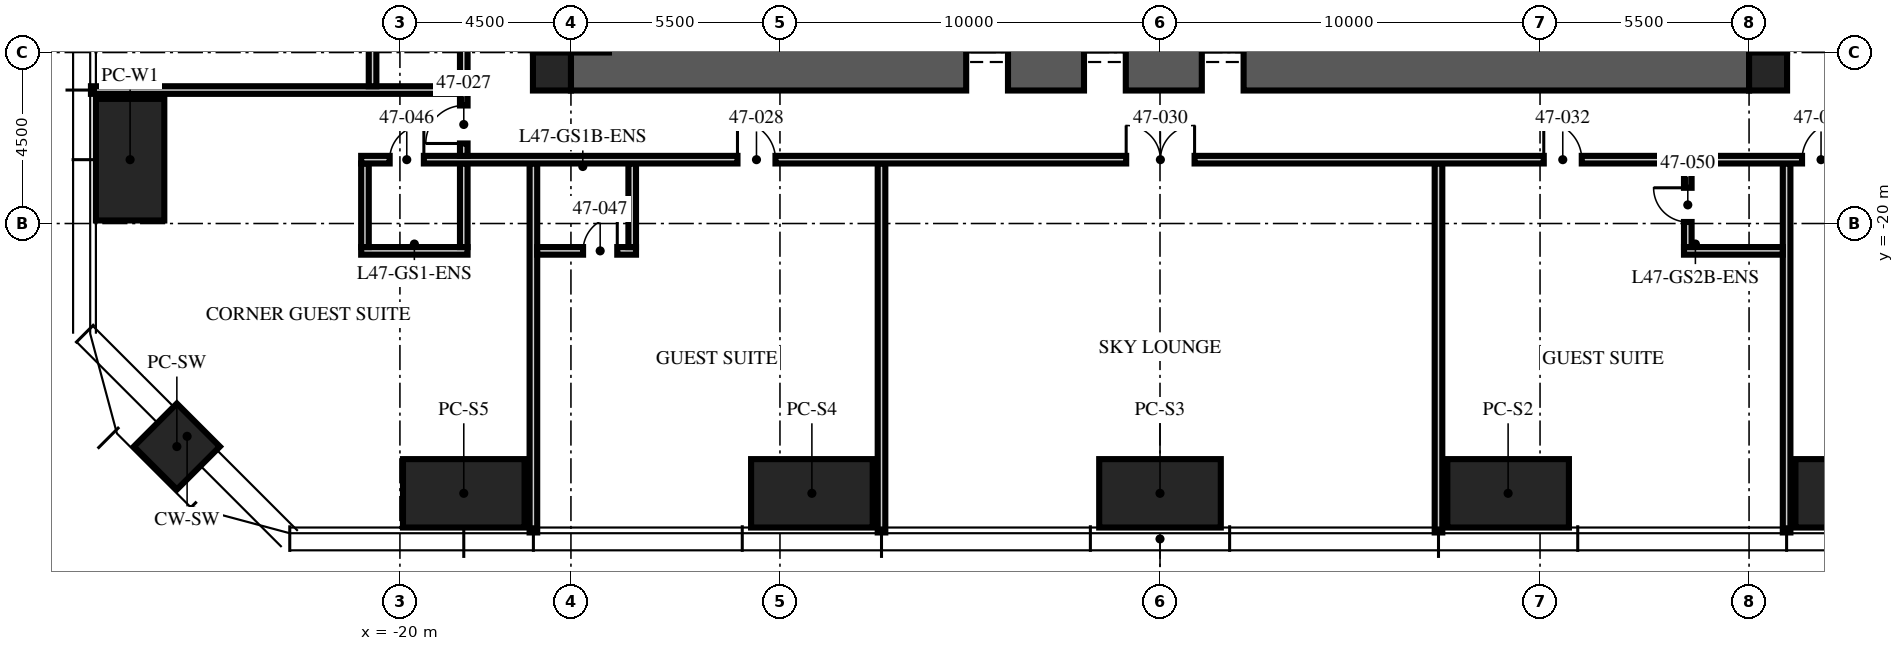
"""IFC4 building model, lengths in metres.
Left out: names, types, materials, properties, quantities, classifications, styles, units other than length and angle.
Written with IfcOpenShell. Run it as: python <this file> out.ifc"""

import sys

from ifc_helpers import new_model, si_unit, direction, frame, frame_2d, origin, origin_2d, place, context, subcontext, project, spatial, rectangle, hollow_rectangle, extrude, element, fill, save


model = new_model("IFC4")
c1 = context("Model", 3, precision=1e-05, world=origin(), true_north=direction((0.0, 1.0)))
c2 = subcontext(c1, "Body", "Model", "MODEL_VIEW")
j1 = project(units=[si_unit("LENGTHUNIT", "METRE"), si_unit("PLANEANGLEUNIT", "RADIAN")], contexts=[c1])
p1 = place(None, origin())
s1 = spatial("IfcSite", under=j1, at=p1, CompositionType="ELEMENT")
p2 = place(p1, origin())
s2 = spatial("IfcBuilding", under=s1, at=p2, CompositionType="ELEMENT")
p3 = place(p2, frame((0.0, 0.0, 186.0)))
s3 = spatial("IfcBuildingStorey", under=s2, at=p3, CompositionType="ELEMENT", Elevation=186.0)
p4 = place(p3, frame((15.5, -15.5, -0.3), z_axis=(0.0, 0.0, 1.0), x_axis=(0.0, 1.0, 0.0)))
e1 = element("IfcWall", 1, at=p4, inside=s3, PredefinedType="SHEAR", context=c2, shape_type="SweptSolid", body=[
    extrude(rectangle(XDim=31.0, YDim=2.0, at=frame_2d((15.5, 0.0))), origin(), (0.0, 0.0, 1.0), 5.95),
])
p5 = place(p4, frame((6.5, 0.0, 0.3)))
e2 = element("IfcOpeningElement", 2, at=p5, cuts=e1, PredefinedType="OPENING", context=c2, shape_type="SweptSolid", body=[
    extrude(rectangle(XDim=1.2, YDim=2.1, at=frame_2d((0.6, 1.05))), frame((0.0, 1.01, 0.0), z_axis=(0.0, -1.0, 0.0), x_axis=(1.0, 0.0, 0.0)), (0.0, 0.0, 1.0), 2.02),
])
p6 = place(p4, frame((23.0, 0.0, 0.3)))
e3 = element("IfcOpeningElement", 3, at=p6, cuts=e1, PredefinedType="OPENING", context=c2, shape_type="SweptSolid", body=[
    extrude(rectangle(XDim=1.8, YDim=2.1, at=frame_2d((0.9, 1.05))), frame((0.0, 1.01, 0.0), z_axis=(0.0, -1.0, 0.0), x_axis=(1.0, 0.0, 0.0)), (0.0, 0.0, 1.0), 2.02),
])
p7 = place(p3, frame((-15.5, -15.5, -0.3), z_axis=(0.0, 0.0, 1.0), x_axis=(1.0, 0.0, 0.0)))
e4 = element("IfcWall", 4, at=p7, inside=s3, PredefinedType="SHEAR", context=c2, shape_type="SweptSolid", body=[
    extrude(rectangle(XDim=31.0, YDim=2.0, at=frame_2d((15.5, 0.0))), origin(), (0.0, 0.0, 1.0), 5.95),
])
p8 = place(p7, frame((10.4, 0.0, 0.3)))
e5 = element("IfcOpeningElement", 5, at=p8, cuts=e4, PredefinedType="OPENING", context=c2, shape_type="SweptSolid", body=[
    extrude(rectangle(XDim=1.1, YDim=2.1, at=frame_2d((0.55, 1.05))), frame((0.0, 1.01, 0.0), z_axis=(0.0, -1.0, 0.0), x_axis=(1.0, 0.0, 0.0)), (0.0, 0.0, 1.0), 2.02),
])
p9 = place(p7, frame((13.5, 0.0, 0.3)))
e6 = element("IfcOpeningElement", 6, at=p9, cuts=e4, PredefinedType="OPENING", context=c2, shape_type="SweptSolid", body=[
    extrude(rectangle(XDim=1.1, YDim=2.1, at=frame_2d((0.55, 1.05))), frame((0.0, 1.01, 0.0), z_axis=(0.0, -1.0, 0.0), x_axis=(1.0, 0.0, 0.0)), (0.0, 0.0, 1.0), 2.02),
])
p10 = place(p7, frame((16.6, 0.0, 0.3)))
e7 = element("IfcOpeningElement", 7, at=p10, cuts=e4, PredefinedType="OPENING", context=c2, shape_type="SweptSolid", body=[
    extrude(rectangle(XDim=1.1, YDim=2.1, at=frame_2d((0.55, 1.05))), frame((0.0, 1.01, 0.0), z_axis=(0.0, -1.0, 0.0), x_axis=(1.0, 0.0, 0.0)), (0.0, 0.0, 1.0), 2.02),
])
p11 = place(p3, frame((-15.5, -15.5, -0.3), z_axis=(0.0, 0.0, 1.0), x_axis=(0.0, 1.0, 0.0)))
e8 = element("IfcWall", 8, at=p11, inside=s3, PredefinedType="SHEAR", context=c2, shape_type="SweptSolid", body=[
    extrude(rectangle(XDim=31.0, YDim=2.0, at=frame_2d((15.5, 0.0))), origin(), (0.0, 0.0, 1.0), 5.95),
])
p12 = place(p11, frame((6.5, 0.0, 0.3)))
e9 = element("IfcOpeningElement", 9, at=p12, cuts=e8, PredefinedType="OPENING", context=c2, shape_type="SweptSolid", body=[
    extrude(rectangle(XDim=1.2, YDim=2.1, at=frame_2d((0.6, 1.05))), frame((0.0, 1.01, 0.0), z_axis=(0.0, -1.0, 0.0), x_axis=(1.0, 0.0, 0.0)), (0.0, 0.0, 1.0), 2.02),
])
p13 = place(p11, frame((23.0, 0.0, 0.3)))
e10 = element("IfcOpeningElement", 10, at=p13, cuts=e8, PredefinedType="OPENING", context=c2, shape_type="SweptSolid", body=[
    extrude(rectangle(XDim=1.8, YDim=2.1, at=frame_2d((0.9, 1.05))), frame((0.0, 1.01, 0.0), z_axis=(0.0, -1.0, 0.0), x_axis=(1.0, 0.0, 0.0)), (0.0, 0.0, 1.0), 2.02),
])
for number, where, z_axis, x_axis in (
    (11, (-16.0, -16.0, -0.3), (0.0, 0.0, 1.0), (1.0, 0.0, 0.0)),
    (12, (16.0, -16.0, -0.3), (0.0, 0.0, 1.0), (1.0, 0.0, 0.0)),
):
    element("IfcColumn", number, at=place(p3, frame(where, z_axis=z_axis, x_axis=x_axis)), inside=s3, PredefinedType="COLUMN", context=c2, shape_type="SweptSolid", body=[
        extrude(rectangle(XDim=1.0, YDim=1.0, at=origin_2d()), origin(), (0.0, 0.0, 1.0), 5.95),
    ])
p14 = place(p3, frame((18.32, -27.1, 0.0), z_axis=(0.0, 0.0, 1.0), x_axis=(1.0, 0.0, 0.0)))
e13 = element("IfcColumn", 13, at=p14, inside=s3, PredefinedType="COLUMN", context=c2, shape_type="SweptSolid", body=[
    extrude(hollow_rectangle(XDim=3.2, YDim=1.8, WallThickness=0.2, at=origin_2d()), origin(), (0.0, 0.0, 1.0), 4.72),
])
p15 = place(p3, frame((9.16, -27.1, 0.0), z_axis=(0.0, 0.0, 1.0), x_axis=(1.0, 0.0, 0.0)))
e14 = element("IfcColumn", 14, at=p15, inside=s3, PredefinedType="COLUMN", context=c2, shape_type="SweptSolid", body=[
    extrude(hollow_rectangle(XDim=3.2, YDim=1.8, WallThickness=0.2, at=origin_2d()), origin(), (0.0, 0.0, 1.0), 4.87),
])
p16 = place(p3, frame((0.0, -27.1, 0.0), z_axis=(0.0, 0.0, 1.0), x_axis=(1.0, 0.0, 0.0)))
e15 = element("IfcColumn", 15, at=p16, inside=s3, PredefinedType="COLUMN", context=c2, shape_type="SweptSolid", body=[
    extrude(hollow_rectangle(XDim=3.2, YDim=1.8, WallThickness=0.2, at=origin_2d()), origin(), (0.0, 0.0, 1.0), 5.03),
])
p17 = place(p3, frame((-9.16, -27.1, 0.0), z_axis=(0.0, 0.0, 1.0), x_axis=(1.0, 0.0, 0.0)))
e16 = element("IfcColumn", 16, at=p17, inside=s3, PredefinedType="COLUMN", context=c2, shape_type="SweptSolid", body=[
    extrude(hollow_rectangle(XDim=3.2, YDim=1.8, WallThickness=0.2, at=origin_2d()), origin(), (0.0, 0.0, 1.0), 4.87),
])
for number, where, z_axis, x_axis in (
    (17, (-18.32, -27.1, 0.0), (0.0, 0.0, 1.0), (1.0, 0.0, 0.0)),
    (18, (-27.1, -18.32, 0.0), (0.0, 0.0, 1.0), (0.0, 1.0, 0.0)),
):
    element("IfcColumn", number, at=place(p3, frame(where, z_axis=z_axis, x_axis=x_axis)), inside=s3, PredefinedType="COLUMN", context=c2, shape_type="SweptSolid", body=[
        extrude(hollow_rectangle(XDim=3.2, YDim=1.8, WallThickness=0.2, at=origin_2d()), origin(), (0.0, 0.0, 1.0), 4.72),
    ])
p18 = place(p3, frame((-25.87, -25.87, 0.0), z_axis=(0.0, 0.0, 1.0), x_axis=(0.707106781187, -0.707106781187, 0.0)))
e19 = element("IfcColumn", 19, at=p18, inside=s3, PredefinedType="COLUMN", context=c2, shape_type="SweptSolid", body=[
    extrude(hollow_rectangle(XDim=1.6, YDim=1.6, WallThickness=0.1, at=origin_2d()), origin(), (0.0, 0.0, 1.0), 4.99),
])
for number, where, z_axis, x_axis in (
    (20, (-16.488, -28.13, 0.0), (0.0, 0.0, 1.0), (0.0, 1.0, 0.0)),
    (21, (-7.328, -28.13, 0.0), (0.0, 0.0, 1.0), (0.0, 1.0, 0.0)),
    (22, (7.328, -28.13, 0.0), (0.0, 0.0, 1.0), (0.0, 1.0, 0.0)),
    (23, (16.488, -28.13, 0.0), (0.0, 0.0, 1.0), (0.0, 1.0, 0.0)),
):
    element("IfcWall", number, at=place(p3, frame(where, z_axis=z_axis, x_axis=x_axis)), inside=s3, PredefinedType="SOLIDWALL", context=c2, shape_type="SweptSolid", body=[
        extrude(rectangle(XDim=9.71, YDim=0.2, at=frame_2d((4.855, 0.0))), origin(), (0.0, 0.0, 1.0), 4.95),
    ])
p19 = place(p3, frame((-21.02, -20.72, 0.0), z_axis=(0.0, 0.0, 1.0), x_axis=(1.0, 0.0, 0.0)))
e24 = element("IfcWall", 24, at=p19, inside=s3, PredefinedType="SOLIDWALL", context=c2, shape_type="SweptSolid", body=[
    extrude(rectangle(XDim=2.8, YDim=0.2, at=frame_2d((1.4, 0.0))), origin(), (0.0, 0.0, 1.0), 4.45),
])
p20 = place(p3, frame((-16.388, -20.72, 0.0), z_axis=(0.0, 0.0, 1.0), x_axis=(1.0, 0.0, 0.0)))
e25 = element("IfcWall", 25, at=p20, inside=s3, PredefinedType="SOLIDWALL", context=c2, shape_type="SweptSolid", body=[
    extrude(rectangle(XDim=2.6, YDim=0.2, at=frame_2d((1.3, 0.0))), origin(), (0.0, 0.0, 1.0), 4.45),
])
p21 = place(p20, frame((1.207, 0.0, 0.0)))
e26 = element("IfcOpeningElement", 26, at=p21, cuts=e25, PredefinedType="OPENING", context=c2, shape_type="SweptSolid", body=[
    extrude(rectangle(XDim=0.9, YDim=2.1, at=frame_2d((0.45, 1.05))), frame((0.0, 0.11, 0.0), z_axis=(0.0, -1.0, 0.0), x_axis=(1.0, 0.0, 0.0)), (0.0, 0.0, 1.0), 0.22),
])
p22 = place(p3, frame((13.788, -20.72, 0.0), z_axis=(0.0, 0.0, 1.0), x_axis=(1.0, 0.0, 0.0)))
e27 = element("IfcWall", 27, at=p22, inside=s3, PredefinedType="SOLIDWALL", context=c2, shape_type="SweptSolid", body=[
    extrude(rectangle(XDim=2.6, YDim=0.2, at=frame_2d((1.3, 0.0))), origin(), (0.0, 0.0, 1.0), 4.45),
])
for number, where, z_axis, x_axis in (
    (28, (-20.92, -20.62, 0.0), (0.0, 0.0, 1.0), (0.0, 1.0, 0.0)),
    (29, (-18.32, -20.62, 0.0), (0.0, 0.0, 1.0), (0.0, 1.0, 0.0)),
    (30, (-13.888, -20.62, 0.0), (0.0, 0.0, 1.0), (0.0, 1.0, 0.0)),
):
    element("IfcWall", number, at=place(p3, frame(where, z_axis=z_axis, x_axis=x_axis)), inside=s3, PredefinedType="SOLIDWALL", context=c2, shape_type="SweptSolid", body=[
        extrude(rectangle(XDim=2.2, YDim=0.2, at=frame_2d((1.1, 0.0))), origin(), (0.0, 0.0, 1.0), 4.45),
    ])
p23 = place(p3, frame((13.888, -20.62, 0.0), z_axis=(0.0, 0.0, 1.0), x_axis=(0.0, 1.0, 0.0)))
e31 = element("IfcWall", 31, at=p23, inside=s3, PredefinedType="SOLIDWALL", context=c2, shape_type="SweptSolid", body=[
    extrude(rectangle(XDim=2.2, YDim=0.2, at=frame_2d((1.1, 0.0))), origin(), (0.0, 0.0, 1.0), 4.45),
])
p24 = place(p23, frame((0.66, 0.0, 0.0)))
e32 = element("IfcOpeningElement", 32, at=p24, cuts=e31, PredefinedType="OPENING", context=c2, shape_type="SweptSolid", body=[
    extrude(rectangle(XDim=0.9, YDim=2.1, at=frame_2d((0.45, 1.05))), frame((0.0, 0.11, 0.0), z_axis=(0.0, -1.0, 0.0), x_axis=(1.0, 0.0, 0.0)), (0.0, 0.0, 1.0), 0.22),
])
p25 = place(p3, frame((-21.02, -18.32, 0.0), z_axis=(0.0, 0.0, 1.0), x_axis=(1.0, 0.0, 0.0)))
e33 = element("IfcWall", 33, at=p25, inside=s3, PredefinedType="SOLIDWALL", context=c2, shape_type="SweptSolid", body=[
    extrude(rectangle(XDim=42.04, YDim=0.2, at=frame_2d((21.02, 0.0))), origin(), (0.0, 0.0, 1.0), 4.45),
])
p26 = place(p25, frame((9.902, 0.0, 0.0)))
e34 = element("IfcOpeningElement", 34, at=p26, cuts=e33, PredefinedType="OPENING", context=c2, shape_type="SweptSolid", body=[
    extrude(rectangle(XDim=1.0, YDim=2.1, at=frame_2d((0.5, 1.05))), frame((0.0, 0.11, 0.0), z_axis=(0.0, -1.0, 0.0), x_axis=(1.0, 0.0, 0.0)), (0.0, 0.0, 1.0), 0.22),
])
p27 = place(p25, frame((20.13, 0.0, 0.0)))
e35 = element("IfcOpeningElement", 35, at=p27, cuts=e33, PredefinedType="OPENING", context=c2, shape_type="SweptSolid", body=[
    extrude(rectangle(XDim=1.8, YDim=2.4, at=frame_2d((0.9, 1.2))), frame((0.0, 0.11, 0.0), z_axis=(0.0, -1.0, 0.0), x_axis=(1.0, 0.0, 0.0)), (0.0, 0.0, 1.0), 0.22),
])
p28 = place(p25, frame((37.914, 0.0, 0.0)))
e36 = element("IfcOpeningElement", 36, at=p28, cuts=e33, PredefinedType="OPENING", context=c2, shape_type="SweptSolid", body=[
    extrude(rectangle(XDim=1.0, YDim=2.1, at=frame_2d((0.5, 1.05))), frame((0.0, 0.11, 0.0), z_axis=(0.0, -1.0, 0.0), x_axis=(1.0, 0.0, 0.0)), (0.0, 0.0, 1.0), 0.22),
])
p29 = place(p25, frame((31.118, 0.0, 0.0)))
e37 = element("IfcOpeningElement", 37, at=p29, cuts=e33, PredefinedType="OPENING", context=c2, shape_type="SweptSolid", body=[
    extrude(rectangle(XDim=1.0, YDim=2.1, at=frame_2d((0.5, 1.05))), frame((0.0, 0.11, 0.0), z_axis=(0.0, -1.0, 0.0), x_axis=(1.0, 0.0, 0.0)), (0.0, 0.0, 1.0), 0.22),
])
p30 = place(p25, frame((0.75, 0.0, 0.0)))
e38 = element("IfcOpeningElement", 38, at=p30, cuts=e33, PredefinedType="OPENING", context=c2, shape_type="SweptSolid", body=[
    extrude(rectangle(XDim=0.9, YDim=2.1, at=frame_2d((0.45, 1.05))), frame((0.0, 0.11, 0.0), z_axis=(0.0, -1.0, 0.0), x_axis=(1.0, 0.0, 0.0)), (0.0, 0.0, 1.0), 0.22),
])
p31 = place(p25, frame((39.99, 0.0, 0.0)))
e39 = element("IfcOpeningElement", 39, at=p31, cuts=e33, PredefinedType="OPENING", context=c2, shape_type="SweptSolid", body=[
    extrude(rectangle(XDim=0.9, YDim=2.1, at=frame_2d((0.45, 1.05))), frame((0.0, 0.11, 0.0), z_axis=(0.0, -1.0, 0.0), x_axis=(1.0, 0.0, 0.0)), (0.0, 0.0, 1.0), 0.22),
])
p32 = place(p3, frame((-18.32, -18.22, 0.0), z_axis=(0.0, 0.0, 1.0), x_axis=(0.0, 1.0, 0.0)))
e40 = element("IfcWall", 40, at=p32, inside=s3, PredefinedType="SOLIDWALL", context=c2, shape_type="SweptSolid", body=[
    extrude(rectangle(XDim=36.44, YDim=0.2, at=frame_2d((18.22, 0.0))), origin(), (0.0, 0.0, 1.0), 4.45),
])
p33 = place(p32, frame((0.326, 0.0, 0.0)))
e41 = element("IfcOpeningElement", 41, at=p33, cuts=e40, PredefinedType="OPENING", context=c2, shape_type="SweptSolid", body=[
    extrude(rectangle(XDim=1.0, YDim=2.1, at=frame_2d((0.5, 1.05))), frame((0.0, 0.11, 0.0), z_axis=(0.0, -1.0, 0.0), x_axis=(1.0, 0.0, 0.0)), (0.0, 0.0, 1.0), 0.22),
])
p34 = place(p32, frame((7.122, 0.0, 0.0)))
e42 = element("IfcOpeningElement", 42, at=p34, cuts=e40, PredefinedType="OPENING", context=c2, shape_type="SweptSolid", body=[
    extrude(rectangle(XDim=1.0, YDim=2.1, at=frame_2d((0.5, 1.05))), frame((0.0, 0.11, 0.0), z_axis=(0.0, -1.0, 0.0), x_axis=(1.0, 0.0, 0.0)), (0.0, 0.0, 1.0), 0.22),
])
p35 = place(p32, frame((28.338, 0.0, 0.0)))
e43 = element("IfcOpeningElement", 43, at=p35, cuts=e40, PredefinedType="OPENING", context=c2, shape_type="SweptSolid", body=[
    extrude(rectangle(XDim=1.0, YDim=2.1, at=frame_2d((0.5, 1.05))), frame((0.0, 0.11, 0.0), z_axis=(0.0, -1.0, 0.0), x_axis=(1.0, 0.0, 0.0)), (0.0, 0.0, 1.0), 0.22),
])
p36 = place(p32, frame((22.34, 0.0, 0.0)))
e44 = element("IfcOpeningElement", 44, at=p36, cuts=e40, PredefinedType="OPENING", context=c2, shape_type="SweptSolid", body=[
    extrude(rectangle(XDim=0.9, YDim=2.1, at=frame_2d((0.45, 1.05))), frame((0.0, 0.11, 0.0), z_axis=(0.0, -1.0, 0.0), x_axis=(1.0, 0.0, 0.0)), (0.0, 0.0, 1.0), 0.22),
])
p37 = place(p32, frame((13.2, 0.0, 0.0)))
e45 = element("IfcOpeningElement", 45, at=p37, cuts=e40, PredefinedType="OPENING", context=c2, shape_type="SweptSolid", body=[
    extrude(rectangle(XDim=0.9, YDim=2.1, at=frame_2d((0.45, 1.05))), frame((0.0, 0.11, 0.0), z_axis=(0.0, -1.0, 0.0), x_axis=(1.0, 0.0, 0.0)), (0.0, 0.0, 1.0), 0.22),
])
p38 = place(p32, frame((17.72, 0.0, 0.0)))
e46 = element("IfcOpeningElement", 46, at=p38, cuts=e40, PredefinedType="OPENING", context=c2, shape_type="SweptSolid", body=[
    extrude(rectangle(XDim=1.0, YDim=2.1, at=frame_2d((0.5, 1.05))), frame((0.0, 0.11, 0.0), z_axis=(0.0, -1.0, 0.0), x_axis=(1.0, 0.0, 0.0)), (0.0, 0.0, 1.0), 0.22),
])
p39 = place(p3, frame((-28.13, -16.488, 0.0), z_axis=(0.0, 0.0, 1.0), x_axis=(1.0, 0.0, 0.0)))
e47 = element("IfcWall", 47, at=p39, inside=s3, PredefinedType="SOLIDWALL", context=c2, shape_type="SweptSolid", body=[
    extrude(rectangle(XDim=9.71, YDim=0.2, at=frame_2d((4.855, 0.0))), origin(), (0.0, 0.0, 1.0), 4.95),
])
p40 = place(p3, frame((-20.72, -16.388, 0.0), z_axis=(0.0, 0.0, 1.0), x_axis=(0.0, 1.0, 0.0)))
e48 = element("IfcWall", 48, at=p40, inside=s3, PredefinedType="SOLIDWALL", context=c2, shape_type="SweptSolid", body=[
    extrude(rectangle(XDim=2.4, YDim=0.2, at=frame_2d((1.2, 0.0))), origin(), (0.0, 0.0, 1.0), 5.65),
])
p41 = place(p40, frame((1.207, 0.0, 0.0)))
e49 = element("IfcOpeningElement", 49, at=p41, cuts=e48, PredefinedType="OPENING", context=c2, shape_type="SweptSolid", body=[
    extrude(rectangle(XDim=0.9, YDim=2.1, at=frame_2d((0.45, 1.05))), frame((0.0, 0.11, 0.0), z_axis=(0.0, -1.0, 0.0), x_axis=(1.0, 0.0, 0.0)), (0.0, 0.0, 1.0), 0.22),
])
p42 = place(p8, origin())
e50 = element("IfcDoor", 50, at=p42, inside=s3, OperationType="DOUBLE_DOOR_SLIDING", PredefinedType="DOOR", context=c2, shape_type="SweptSolid", body=[
    extrude(rectangle(XDim=1.1, YDim=2.1, at=frame_2d((0.55, 1.05))), frame((0.0, 0.025, 0.0), z_axis=(0.0, -1.0, 0.0), x_axis=(1.0, 0.0, 0.0)), (0.0, 0.0, 1.0), 0.05),
])
fill(e5, e50)
p43 = place(p9, origin())
e51 = element("IfcDoor", 51, at=p43, inside=s3, OperationType="DOUBLE_DOOR_SLIDING", PredefinedType="DOOR", context=c2, shape_type="SweptSolid", body=[
    extrude(rectangle(XDim=1.1, YDim=2.1, at=frame_2d((0.55, 1.05))), frame((0.0, 0.025, 0.0), z_axis=(0.0, -1.0, 0.0), x_axis=(1.0, 0.0, 0.0)), (0.0, 0.0, 1.0), 0.05),
])
fill(e6, e51)
p44 = place(p10, origin())
e52 = element("IfcDoor", 52, at=p44, inside=s3, OperationType="DOUBLE_DOOR_SLIDING", PredefinedType="DOOR", context=c2, shape_type="SweptSolid", body=[
    extrude(rectangle(XDim=1.1, YDim=2.1, at=frame_2d((0.55, 1.05))), frame((0.0, 0.025, 0.0), z_axis=(0.0, -1.0, 0.0), x_axis=(1.0, 0.0, 0.0)), (0.0, 0.0, 1.0), 0.05),
])
fill(e7, e52)
p45 = place(p33, origin())
e53 = element("IfcDoor", 53, at=p45, inside=s3, OperationType="SINGLE_SWING_LEFT", PredefinedType="DOOR", context=c2, shape_type="SweptSolid", body=[
    extrude(rectangle(XDim=1.0, YDim=2.1, at=frame_2d((0.5, 1.05))), frame((0.0, 0.025, 0.0), z_axis=(0.0, -1.0, 0.0), x_axis=(1.0, 0.0, 0.0)), (0.0, 0.0, 1.0), 0.05),
])
fill(e41, e53)
p46 = place(p26, origin())
e54 = element("IfcDoor", 54, at=p46, inside=s3, OperationType="SINGLE_SWING_LEFT", PredefinedType="DOOR", context=c2, shape_type="SweptSolid", body=[
    extrude(rectangle(XDim=1.0, YDim=2.1, at=frame_2d((0.5, 1.05))), frame((0.0, 0.025, 0.0), z_axis=(0.0, -1.0, 0.0), x_axis=(1.0, 0.0, 0.0)), (0.0, 0.0, 1.0), 0.05),
])
fill(e34, e54)
p47 = place(p27, origin())
e55 = element("IfcDoor", 55, at=p47, inside=s3, OperationType="DOUBLE_DOOR_SINGLE_SWING", PredefinedType="DOOR", context=c2, shape_type="SweptSolid", body=[
    extrude(rectangle(XDim=1.8, YDim=2.4, at=frame_2d((0.9, 1.2))), frame((0.0, 0.025, 0.0), z_axis=(0.0, -1.0, 0.0), x_axis=(1.0, 0.0, 0.0)), (0.0, 0.0, 1.0), 0.05),
])
fill(e35, e55)
p48 = place(p28, origin())
e56 = element("IfcDoor", 56, at=p48, inside=s3, OperationType="SINGLE_SWING_RIGHT", PredefinedType="DOOR", context=c2, shape_type="SweptSolid", body=[
    extrude(rectangle(XDim=1.0, YDim=2.1, at=frame_2d((0.5, 1.05))), frame((0.0, 0.025, 0.0), z_axis=(0.0, -1.0, 0.0), x_axis=(1.0, 0.0, 0.0)), (0.0, 0.0, 1.0), 0.05),
])
fill(e36, e56)
p49 = place(p29, origin())
e57 = element("IfcDoor", 57, at=p49, inside=s3, OperationType="SINGLE_SWING_LEFT", PredefinedType="DOOR", context=c2, shape_type="SweptSolid", body=[
    extrude(rectangle(XDim=1.0, YDim=2.1, at=frame_2d((0.5, 1.05))), frame((0.0, 0.025, 0.0), z_axis=(0.0, -1.0, 0.0), x_axis=(1.0, 0.0, 0.0)), (0.0, 0.0, 1.0), 0.05),
])
fill(e37, e57)
p50 = place(p30, origin())
e58 = element("IfcDoor", 58, at=p50, inside=s3, OperationType="SINGLE_SWING_RIGHT", PredefinedType="DOOR", context=c2, shape_type="SweptSolid", body=[
    extrude(rectangle(XDim=0.9, YDim=2.1, at=frame_2d((0.45, 1.05))), frame((0.0, 0.025, 0.0), z_axis=(0.0, -1.0, 0.0), x_axis=(1.0, 0.0, 0.0)), (0.0, 0.0, 1.0), 0.05),
])
fill(e38, e58)
p51 = place(p21, origin())
e59 = element("IfcDoor", 59, at=p51, inside=s3, OperationType="SINGLE_SWING_RIGHT", PredefinedType="DOOR", context=c2, shape_type="SweptSolid", body=[
    extrude(rectangle(XDim=0.9, YDim=2.1, at=frame_2d((0.45, 1.05))), frame((0.0, 0.025, 0.0), z_axis=(0.0, -1.0, 0.0), x_axis=(1.0, 0.0, 0.0)), (0.0, 0.0, 1.0), 0.05),
])
fill(e26, e59)
p52 = place(p24, origin())
e60 = element("IfcDoor", 60, at=p52, inside=s3, OperationType="SINGLE_SWING_RIGHT", PredefinedType="DOOR", context=c2, shape_type="SweptSolid", body=[
    extrude(rectangle(XDim=0.9, YDim=2.1, at=frame_2d((0.45, 1.05))), frame((0.0, 0.025, 0.0), z_axis=(0.0, -1.0, 0.0), x_axis=(1.0, 0.0, 0.0)), (0.0, 0.0, 1.0), 0.05),
])
fill(e32, e60)
save(model, sys.argv[1])
